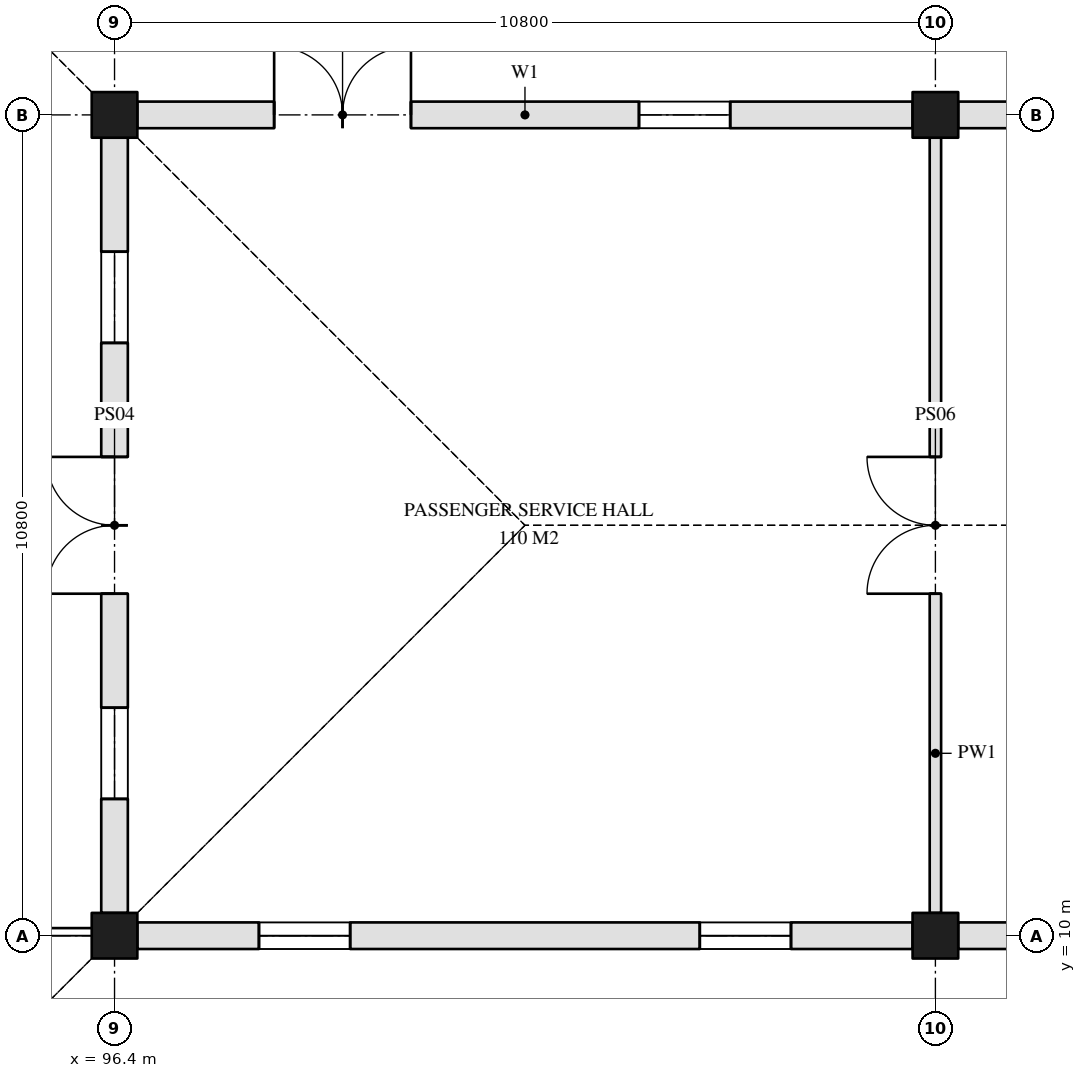
"""IFC4 building model, lengths in metres.
Left out: names, types, materials, properties, quantities, classifications, styles, units other than length and angle.
Written with IfcOpenShell. Run it as: python <this file> out.ifc"""

import sys

from ifc_helpers import new_model, si_unit, direction, frame, frame_2d, origin, origin_2d, place, context, subcontext, project, spatial, rectangle, extrude, element, fill, save


model = new_model("IFC4")
c1 = context("Model", 3, precision=1e-05, world=origin(), true_north=direction((0.0, 1.0)))
c2 = subcontext(c1, "Body", "Model", "MODEL_VIEW")
j1 = project(units=[si_unit("LENGTHUNIT", "METRE"), si_unit("PLANEANGLEUNIT", "RADIAN")], contexts=[c1])
p1 = place(None, origin())
s1 = spatial("IfcSite", under=j1, at=p1, CompositionType="ELEMENT")
p2 = place(p1, origin())
s2 = spatial("IfcBuilding", under=s1, at=p2, CompositionType="ELEMENT")
p3 = place(p2, origin())
s3 = spatial("IfcBuildingStorey", under=s2, at=p3, CompositionType="ELEMENT", Elevation=0.0)
for number, where, z_axis, x_axis in (
    (1, (96.4, 10.0, 0.0), (0.0, 0.0, 1.0), (1.0, 0.0, 0.0)),
    (2, (96.4, 20.8, 0.0), (0.0, 0.0, 1.0), (1.0, 0.0, 0.0)),
    (3, (107.2, 10.0, 0.0), (0.0, 0.0, 1.0), (1.0, 0.0, 0.0)),
    (4, (107.2, 20.8, 0.0), (0.0, 0.0, 1.0), (1.0, 0.0, 0.0)),
):
    element("IfcColumn", number, at=place(p3, frame(where, z_axis=z_axis, x_axis=x_axis)), inside=s3, PredefinedType="COLUMN", context=c2, shape_type="SweptSolid", body=[
        extrude(rectangle(XDim=0.6, YDim=0.6, at=origin_2d()), origin(), (0.0, 0.0, 1.0), 4.5),
    ])
p4 = place(p3, frame((96.7, 10.0, 0.0), z_axis=(0.0, 0.0, 1.0), x_axis=(1.0, 0.0, 0.0)))
e5 = element("IfcWall", 5, at=p4, inside=s3, PredefinedType="SOLIDWALL", context=c2, shape_type="SweptSolid", body=[
    extrude(rectangle(XDim=10.2, YDim=0.35, at=frame_2d((5.1, 0.0))), origin(), (0.0, 0.0, 1.0), 3.9),
])
p5 = place(p4, frame((1.6, 0.0, 0.6)))
e6 = element("IfcOpeningElement", 6, at=p5, cuts=e5, PredefinedType="OPENING", context=c2, shape_type="SweptSolid", body=[
    extrude(rectangle(XDim=1.2, YDim=2.7, at=frame_2d((0.6, 1.35))), frame((0.0, 0.185, 0.0), z_axis=(0.0, -1.0, 0.0), x_axis=(1.0, 0.0, 0.0)), (0.0, 0.0, 1.0), 0.37),
])
p6 = place(p4, frame((7.4, 0.0, 0.6)))
e7 = element("IfcOpeningElement", 7, at=p6, cuts=e5, PredefinedType="OPENING", context=c2, shape_type="SweptSolid", body=[
    extrude(rectangle(XDim=1.2, YDim=2.7, at=frame_2d((0.6, 1.35))), frame((0.0, 0.185, 0.0), z_axis=(0.0, -1.0, 0.0), x_axis=(1.0, 0.0, 0.0)), (0.0, 0.0, 1.0), 0.37),
])
p7 = place(p3, frame((107.5, 10.0, 0.0), z_axis=(0.0, 0.0, 1.0), x_axis=(1.0, 0.0, 0.0)))
e8 = element("IfcWall", 8, at=p7, inside=s3, PredefinedType="SOLIDWALL", context=c2, shape_type="SweptSolid", body=[
    extrude(rectangle(XDim=10.2, YDim=0.35, at=frame_2d((5.1, 0.0))), origin(), (0.0, 0.0, 1.0), 3.9),
])
p8 = place(p7, frame((1.3, 0.0, 0.6)))
e9 = element("IfcOpeningElement", 9, at=p8, cuts=e8, PredefinedType="OPENING", context=c2, shape_type="SweptSolid", body=[
    extrude(rectangle(XDim=1.2, YDim=2.7, at=frame_2d((0.6, 1.35))), frame((0.0, 0.185, 0.0), z_axis=(0.0, -1.0, 0.0), x_axis=(1.0, 0.0, 0.0)), (0.0, 0.0, 1.0), 0.37),
])
p9 = place(p7, frame((7.3, 0.0, 0.6)))
e10 = element("IfcOpeningElement", 10, at=p9, cuts=e8, PredefinedType="OPENING", context=c2, shape_type="SweptSolid", body=[
    extrude(rectangle(XDim=1.2, YDim=2.7, at=frame_2d((0.6, 1.35))), frame((0.0, 0.185, 0.0), z_axis=(0.0, -1.0, 0.0), x_axis=(1.0, 0.0, 0.0)), (0.0, 0.0, 1.0), 0.37),
])
p10 = place(p3, frame((96.7, 20.8, 0.0), z_axis=(0.0, 0.0, 1.0), x_axis=(1.0, 0.0, 0.0)))
e11 = element("IfcWall", 11, at=p10, inside=s3, PredefinedType="SOLIDWALL", context=c2, shape_type="SweptSolid", body=[
    extrude(rectangle(XDim=10.2, YDim=0.35, at=frame_2d((5.1, 0.0))), origin(), (0.0, 0.0, 1.0), 3.9),
])
p11 = place(p10, frame((1.8, 0.0, 0.0)))
e12 = element("IfcOpeningElement", 12, at=p11, cuts=e11, PredefinedType="OPENING", context=c2, shape_type="SweptSolid", body=[
    extrude(rectangle(XDim=1.8, YDim=2.4, at=frame_2d((0.9, 1.2))), frame((0.0, 0.185, 0.0), z_axis=(0.0, -1.0, 0.0), x_axis=(1.0, 0.0, 0.0)), (0.0, 0.0, 1.0), 0.37),
])
p12 = place(p10, frame((6.6, 0.0, 0.6)))
e13 = element("IfcOpeningElement", 13, at=p12, cuts=e11, PredefinedType="OPENING", context=c2, shape_type="SweptSolid", body=[
    extrude(rectangle(XDim=1.2, YDim=2.7, at=frame_2d((0.6, 1.35))), frame((0.0, 0.185, 0.0), z_axis=(0.0, -1.0, 0.0), x_axis=(1.0, 0.0, 0.0)), (0.0, 0.0, 1.0), 0.37),
])
p13 = place(p3, frame((107.5, 20.8, 0.0), z_axis=(0.0, 0.0, 1.0), x_axis=(1.0, 0.0, 0.0)))
e14 = element("IfcWall", 14, at=p13, inside=s3, PredefinedType="SOLIDWALL", context=c2, shape_type="SweptSolid", body=[
    extrude(rectangle(XDim=10.2, YDim=0.35, at=frame_2d((5.1, 0.0))), origin(), (0.0, 0.0, 1.0), 3.9),
])
p14 = place(p13, frame((1.0, 0.0, 0.0)))
e15 = element("IfcOpeningElement", 15, at=p14, cuts=e14, PredefinedType="OPENING", context=c2, shape_type="SweptSolid", body=[
    extrude(rectangle(XDim=1.8, YDim=2.4, at=frame_2d((0.9, 1.2))), frame((0.0, 0.185, 0.0), z_axis=(0.0, -1.0, 0.0), x_axis=(1.0, 0.0, 0.0)), (0.0, 0.0, 1.0), 0.37),
])
p15 = place(p13, frame((7.2, 0.0, 0.0)))
e16 = element("IfcOpeningElement", 16, at=p15, cuts=e14, PredefinedType="OPENING", context=c2, shape_type="SweptSolid", body=[
    extrude(rectangle(XDim=1.8, YDim=2.4, at=frame_2d((0.9, 1.2))), frame((0.0, 0.185, 0.0), z_axis=(0.0, -1.0, 0.0), x_axis=(1.0, 0.0, 0.0)), (0.0, 0.0, 1.0), 0.37),
])
p16 = place(p3, frame((96.4, 10.3, 0.0), z_axis=(0.0, 0.0, 1.0), x_axis=(0.0, 1.0, 0.0)))
e17 = element("IfcWall", 17, at=p16, inside=s3, PredefinedType="SOLIDWALL", context=c2, shape_type="SweptSolid", body=[
    extrude(rectangle(XDim=10.2, YDim=0.35, at=frame_2d((5.1, 0.0))), origin(), (0.0, 0.0, 1.0), 3.9),
])
p17 = place(p16, frame((1.5, 0.0, 0.6)))
e18 = element("IfcOpeningElement", 18, at=p17, cuts=e17, PredefinedType="OPENING", context=c2, shape_type="SweptSolid", body=[
    extrude(rectangle(XDim=1.2, YDim=2.7, at=frame_2d((0.6, 1.35))), frame((0.0, 0.185, 0.0), z_axis=(0.0, -1.0, 0.0), x_axis=(1.0, 0.0, 0.0)), (0.0, 0.0, 1.0), 0.37),
])
p18 = place(p16, frame((4.2, 0.0, 0.0)))
e19 = element("IfcOpeningElement", 19, at=p18, cuts=e17, PredefinedType="OPENING", context=c2, shape_type="SweptSolid", body=[
    extrude(rectangle(XDim=1.8, YDim=2.4, at=frame_2d((0.9, 1.2))), frame((0.0, 0.185, 0.0), z_axis=(0.0, -1.0, 0.0), x_axis=(1.0, 0.0, 0.0)), (0.0, 0.0, 1.0), 0.37),
])
p19 = place(p16, frame((7.5, 0.0, 0.6)))
e20 = element("IfcOpeningElement", 20, at=p19, cuts=e17, PredefinedType="OPENING", context=c2, shape_type="SweptSolid", body=[
    extrude(rectangle(XDim=1.2, YDim=2.7, at=frame_2d((0.6, 1.35))), frame((0.0, 0.185, 0.0), z_axis=(0.0, -1.0, 0.0), x_axis=(1.0, 0.0, 0.0)), (0.0, 0.0, 1.0), 0.37),
])
p20 = place(p3, frame((107.2, 10.3, 0.0), z_axis=(0.0, 0.0, 1.0), x_axis=(0.0, 1.0, 0.0)))
e21 = element("IfcWall", 21, at=p20, inside=s3, PredefinedType="PARTITIONING", context=c2, shape_type="SweptSolid", body=[
    extrude(rectangle(XDim=10.2, YDim=0.15, at=frame_2d((5.1, 0.0))), origin(), (0.0, 0.0, 1.0), 3.9),
])
p21 = place(p20, frame((4.2, 0.0, 0.0)))
e22 = element("IfcOpeningElement", 22, at=p21, cuts=e21, PredefinedType="OPENING", context=c2, shape_type="SweptSolid", body=[
    extrude(rectangle(XDim=1.8, YDim=2.1, at=frame_2d((0.9, 1.05))), frame((0.0, 0.085, 0.0), z_axis=(0.0, -1.0, 0.0), x_axis=(1.0, 0.0, 0.0)), (0.0, 0.0, 1.0), 0.17),
])
p22 = place(p5, origin())
e23 = element("IfcWindow", 23, at=p22, inside=s3, PartitioningType="SINGLE_PANEL", PredefinedType="WINDOW", context=c2, shape_type="SweptSolid", body=[
    extrude(rectangle(XDim=1.2, YDim=2.7, at=frame_2d((0.6, 1.35))), frame((0.0, 0.03, 0.0), z_axis=(0.0, -1.0, 0.0), x_axis=(1.0, 0.0, 0.0)), (0.0, 0.0, 1.0), 0.06),
])
fill(e6, e23)
p23 = place(p6, origin())
e24 = element("IfcWindow", 24, at=p23, inside=s3, PartitioningType="SINGLE_PANEL", PredefinedType="WINDOW", context=c2, shape_type="SweptSolid", body=[
    extrude(rectangle(XDim=1.2, YDim=2.7, at=frame_2d((0.6, 1.35))), frame((0.0, 0.03, 0.0), z_axis=(0.0, -1.0, 0.0), x_axis=(1.0, 0.0, 0.0)), (0.0, 0.0, 1.0), 0.06),
])
fill(e7, e24)
p24 = place(p11, origin())
e25 = element("IfcDoor", 25, at=p24, inside=s3, OperationType="SINGLE_SWING_LEFT", PredefinedType="DOOR", context=c2, shape_type="SweptSolid", body=[
    extrude(rectangle(XDim=1.8, YDim=2.4, at=frame_2d((0.9, 1.2))), frame((0.0, 0.025, 0.0), z_axis=(0.0, -1.0, 0.0), x_axis=(1.0, 0.0, 0.0)), (0.0, 0.0, 1.0), 0.05),
])
fill(e12, e25)
p25 = place(p12, origin())
e26 = element("IfcWindow", 26, at=p25, inside=s3, PartitioningType="SINGLE_PANEL", PredefinedType="WINDOW", context=c2, shape_type="SweptSolid", body=[
    extrude(rectangle(XDim=1.2, YDim=2.7, at=frame_2d((0.6, 1.35))), frame((0.0, 0.03, 0.0), z_axis=(0.0, -1.0, 0.0), x_axis=(1.0, 0.0, 0.0)), (0.0, 0.0, 1.0), 0.06),
])
fill(e13, e26)
p26 = place(p17, origin())
e27 = element("IfcWindow", 27, at=p26, inside=s3, PartitioningType="SINGLE_PANEL", PredefinedType="WINDOW", context=c2, shape_type="SweptSolid", body=[
    extrude(rectangle(XDim=1.2, YDim=2.7, at=frame_2d((0.6, 1.35))), frame((0.0, 0.03, 0.0), z_axis=(0.0, -1.0, 0.0), x_axis=(1.0, 0.0, 0.0)), (0.0, 0.0, 1.0), 0.06),
])
fill(e18, e27)
p27 = place(p18, origin())
e28 = element("IfcDoor", 28, at=p27, inside=s3, OperationType="SINGLE_SWING_LEFT", PredefinedType="DOOR", context=c2, shape_type="SweptSolid", body=[
    extrude(rectangle(XDim=1.8, YDim=2.4, at=frame_2d((0.9, 1.2))), frame((0.0, 0.025, 0.0), z_axis=(0.0, -1.0, 0.0), x_axis=(1.0, 0.0, 0.0)), (0.0, 0.0, 1.0), 0.05),
])
fill(e19, e28)
p28 = place(p19, origin())
e29 = element("IfcWindow", 29, at=p28, inside=s3, PartitioningType="SINGLE_PANEL", PredefinedType="WINDOW", context=c2, shape_type="SweptSolid", body=[
    extrude(rectangle(XDim=1.2, YDim=2.7, at=frame_2d((0.6, 1.35))), frame((0.0, 0.03, 0.0), z_axis=(0.0, -1.0, 0.0), x_axis=(1.0, 0.0, 0.0)), (0.0, 0.0, 1.0), 0.06),
])
fill(e20, e29)
p29 = place(p21, origin())
e30 = element("IfcDoor", 30, at=p29, inside=s3, OperationType="SINGLE_SWING_LEFT", PredefinedType="DOOR", context=c2, shape_type="SweptSolid", body=[
    extrude(rectangle(XDim=1.8, YDim=2.1, at=frame_2d((0.9, 1.05))), frame((0.0, 0.025, 0.0), z_axis=(0.0, -1.0, 0.0), x_axis=(1.0, 0.0, 0.0)), (0.0, 0.0, 1.0), 0.05),
])
fill(e22, e30)
save(model, sys.argv[1])
